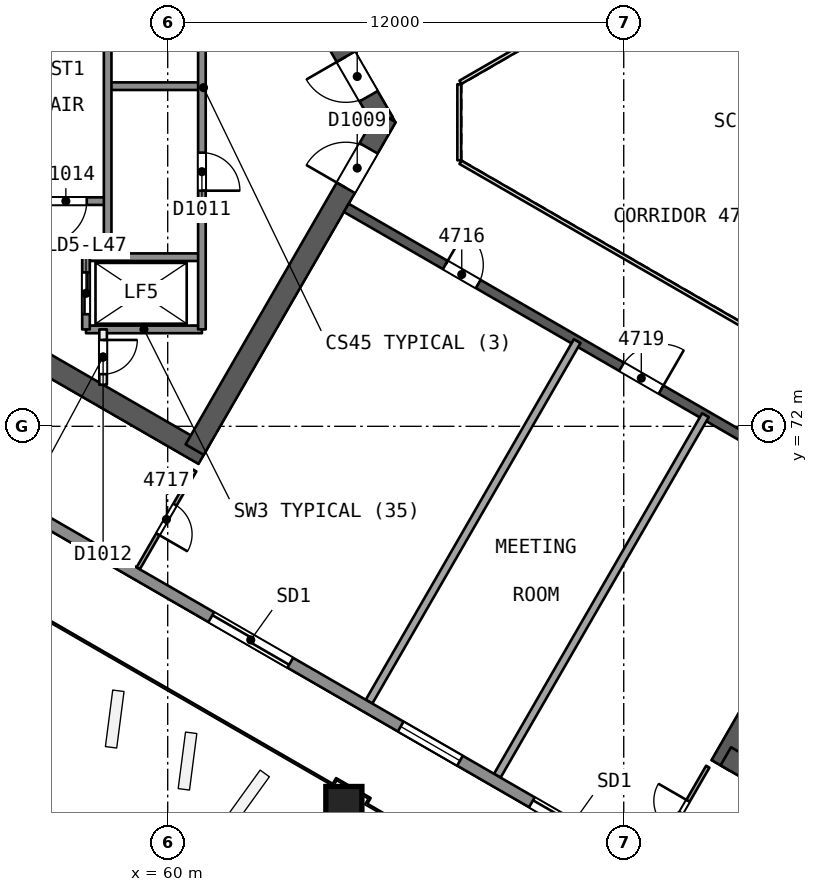
"""IFC4 building model, lengths in metres.
Left out: names, types, materials, properties, quantities, classifications, styles, units other than length and angle.
Written with IfcOpenShell. Run it as: python <this file> out.ifc"""

import sys

from ifc_helpers import new_model, si_unit, direction, frame, frame_2d, origin, origin_2d, place, context, subcontext, project, spatial, rectangle, extrude, element, fill, save


model = new_model("IFC4")
c1 = context("Model", 3, precision=1e-05, world=origin(), true_north=direction((0.0, 1.0)))
c2 = subcontext(c1, "Body", "Model", "MODEL_VIEW")
j1 = project(units=[si_unit("LENGTHUNIT", "METRE"), si_unit("PLANEANGLEUNIT", "RADIAN")], contexts=[c1])
p1 = place(None, origin())
s1 = spatial("IfcSite", under=j1, at=p1, CompositionType="ELEMENT")
p2 = place(p1, origin())
s2 = spatial("IfcBuilding", under=s1, at=p2, CompositionType="ELEMENT")
p3 = place(p2, frame((0.0, 0.0, 193.3)))
s3 = spatial("IfcBuildingStorey", under=s2, at=p3, CompositionType="ELEMENT", Elevation=193.3)
p4 = place(p3, frame((65.682, 80.0, 0.0), z_axis=(0.0, 0.0, 1.0), x_axis=(-0.500000202252, 0.866025287014, 0.0)))
e1 = element("IfcWall", 1, at=p4, inside=s3, PredefinedType="SHEAR", context=c2, shape_type="SweptSolid", body=[
    extrude(rectangle(XDim=10.221, YDim=0.55, at=frame_2d((5.111, 0.0))), origin(), (0.0, 0.0, 1.0), 3.7),
])
p5 = place(p4, frame((0.791, 0.0, 0.0)))
e2 = element("IfcOpeningElement", 2, at=p5, cuts=e1, PredefinedType="OPENING", context=c2, shape_type="SweptSolid", body=[
    extrude(rectangle(XDim=1.2, YDim=2.1, at=frame_2d((0.6, 1.05))), frame((0.0, 0.286, 0.0), z_axis=(0.0, -1.0, 0.0), x_axis=(1.0, 0.0, 0.0)), (0.0, 0.0, 1.0), 0.571),
])
p6 = place(p3, frame((60.709, 88.614, 0.0), z_axis=(0.0, 0.0, 1.0), x_axis=(-0.866020164116, -0.500009075263, 0.0)))
e3 = element("IfcWall", 3, at=p6, inside=s3, PredefinedType="SHEAR", context=c2, shape_type="SweptSolid", body=[
    extrude(rectangle(XDim=14.058, YDim=0.55, at=frame_2d((7.029, 0.0))), origin(), (0.0, 0.0, 1.0), 3.7),
])
p7 = place(p3, frame((48.672, 78.336, 0.0), z_axis=(0.0, 0.0, 1.0), x_axis=(0.866023530946, -0.500003243837, 0.0)))
e4 = element("IfcWall", 4, at=p7, inside=s3, PredefinedType="SHEAR", context=c2, shape_type="SweptSolid", body=[
    extrude(rectangle(XDim=14.175, YDim=0.55, at=frame_2d((7.087, 0.0))), origin(), (0.0, 0.0, 1.0), 3.7),
])
p8 = place(p3, frame((60.709, 71.386, 0.0), z_axis=(0.0, 0.0, 1.0), x_axis=(0.500015938302, 0.866016201606, 0.0)))
e5 = element("IfcWall", 5, at=p8, inside=s3, PredefinedType="SHEAR", context=c2, shape_type="SweptSolid", body=[
    extrude(rectangle(XDim=10.105, YDim=0.55, at=frame_2d((5.053, 0.0))), origin(), (0.0, 0.0, 1.0), 3.7),
])
p9 = place(p8, frame((7.955, 0.0, 0.0)))
e6 = element("IfcOpeningElement", 6, at=p9, cuts=e5, PredefinedType="OPENING", context=c2, shape_type="SweptSolid", body=[
    extrude(rectangle(XDim=1.2, YDim=2.1, at=frame_2d((0.6, 1.05))), frame((0.0, 0.286, 0.0), z_axis=(0.0, -1.0, 0.0), x_axis=(1.0, 0.0, 0.0)), (0.0, 0.0, 1.0), 0.571),
])
p10 = place(p3, frame((79.659, 71.931, 0.0), z_axis=(0.0, 0.0, 1.0), x_axis=(-0.500000202252, -0.866025287014, 0.0)))
e7 = element("IfcWall", 7, at=p10, inside=s3, PredefinedType="SHEAR", context=c2, shape_type="SweptSolid", body=[
    extrude(rectangle(XDim=10.221, YDim=0.55, at=frame_2d((5.111, 0.0))), origin(), (0.0, 0.0, 1.0), 3.7),
])
p11 = place(p10, frame((0.791, 0.0, 0.0)))
e8 = element("IfcOpeningElement", 8, at=p11, cuts=e7, PredefinedType="OPENING", context=c2, shape_type="SweptSolid", body=[
    extrude(rectangle(XDim=1.2, YDim=2.1, at=frame_2d((0.6, 1.05))), frame((0.0, 0.286, 0.0), z_axis=(0.0, -1.0, 0.0), x_axis=(1.0, 0.0, 0.0)), (0.0, 0.0, 1.0), 0.571),
])
p12 = place(p3, frame((74.686, 63.317, 0.0), z_axis=(0.0, 0.0, 1.0), x_axis=(0.866024505738, -0.500001555459, 0.0)))
e9 = element("IfcWall", 9, at=p12, inside=s3, PredefinedType="SHEAR", context=c2, shape_type="SweptSolid", body=[
    extrude(rectangle(XDim=14.059, YDim=0.55, at=frame_2d((7.029, 0.0))), origin(), (0.0, 0.0, 1.0), 3.7),
])
p13 = place(p3, frame((64.7, 77.748, 0.0), z_axis=(0.0, 0.0, 1.0), x_axis=(0.866026492143, -0.499998114903, 0.0)))
e10 = element("IfcWall", 10, at=p13, inside=s3, PredefinedType="SHEAR", context=c2, shape_type="SweptSolid", body=[
    extrude(rectangle(XDim=15.588, YDim=0.25, at=frame_2d((7.794, 0.0))), origin(), (0.0, 0.0, 1.0), 3.3),
])
p14 = place(p13, frame((3.007, 0.0, 0.0)))
e11 = element("IfcOpeningElement", 11, at=p14, cuts=e10, PredefinedType="OPENING", context=c2, shape_type="SweptSolid", body=[
    extrude(rectangle(XDim=1.0, YDim=2.1, at=frame_2d((0.5, 1.05))), frame((0.0, 0.135, 0.0), z_axis=(0.0, -1.0, 0.0), x_axis=(1.0, 0.0, 0.0)), (0.0, 0.0, 1.0), 0.271),
])
p15 = place(p13, frame((8.363, 0.0, 0.0)))
e12 = element("IfcOpeningElement", 12, at=p15, cuts=e10, PredefinedType="OPENING", context=c2, shape_type="SweptSolid", body=[
    extrude(rectangle(XDim=1.2, YDim=2.4, at=frame_2d((0.6, 1.2))), frame((0.0, 0.135, 0.0), z_axis=(0.0, -1.0, 0.0), x_axis=(1.0, 0.0, 0.0)), (0.0, 0.0, 1.0), 0.271),
])
p16 = place(p13, frame((12.75, 0.0, 0.0)))
e13 = element("IfcOpeningElement", 13, at=p16, cuts=e10, PredefinedType="OPENING", context=c2, shape_type="SweptSolid", body=[
    extrude(rectangle(XDim=1.0, YDim=2.1, at=frame_2d((0.5, 1.05))), frame((0.0, 0.135, 0.0), z_axis=(0.0, -1.0, 0.0), x_axis=(1.0, 0.0, 0.0)), (0.0, 0.0, 1.0), 0.271),
])
p17 = place(p3, frame((64.624, 62.027, 0.0), z_axis=(0.010093620709, 0.017482414954, 0.999796221231), x_axis=(-0.499907122366, -0.865843723195, 0.020187025824)))
e14 = element("IfcColumn", 14, at=p17, inside=s3, PredefinedType="COLUMN", context=c2, shape_type="SweptSolid", body=[
    extrude(rectangle(XDim=0.95, YDim=0.95, at=origin_2d()), origin(), (0.0, 0.0, 1.0), 3.701),
])
p18 = place(p3, frame((60.71, 70.838, 0.0), z_axis=(0.0, 0.0, 1.0), x_axis=(-0.49997816789, -0.866038008192, 0.0)))
e15 = element("IfcWall", 15, at=p18, inside=s3, PredefinedType="PARTITIONING", context=c2, shape_type="SweptSolid", body=[
    extrude(rectangle(XDim=2.975, YDim=0.1, at=frame_2d((1.488, 0.0))), origin(), (0.0, 0.0, 1.0), 3.3),
])
p19 = place(p18, frame((1.038, 0.0, 0.0)))
e16 = element("IfcOpeningElement", 16, at=p19, cuts=e15, PredefinedType="OPENING", context=c2, shape_type="SweptSolid", body=[
    extrude(rectangle(XDim=0.9, YDim=2.1, at=frame_2d((0.45, 1.05))), frame((0.0, 0.061, 0.0), z_axis=(0.0, -1.0, 0.0), x_axis=(1.0, 0.0, 0.0)), (0.0, 0.0, 1.0), 0.121),
])
for number, where, z_axis, x_axis in (
    (17, (65.298, 64.754, 0.0), (0.0, 0.0, 1.0), (0.5, 0.866, 0.0)),
    (18, (68.673, 62.806, 0.0), (0.0, 0.0, 1.0), (0.5, 0.866, 0.0)),
):
    element("IfcWall", number, at=place(p3, frame(where, z_axis=z_axis, x_axis=x_axis)), inside=s3, PredefinedType="PARTITIONING", context=c2, shape_type="SweptSolid", body=[
        extrude(rectangle(XDim=10.954, YDim=0.2, at=frame_2d((5.477, 0.0))), origin(), (0.0, 0.0, 1.0), 3.3),
    ])
p20 = place(p3, frame((72.723, 60.468, 0.0), z_axis=(0.0, 0.0, 1.0), x_axis=(0.49997816789, 0.866038008192, 0.0)))
e19 = element("IfcWall", 19, at=p20, inside=s3, PredefinedType="PARTITIONING", context=c2, shape_type="SweptSolid", body=[
    extrude(rectangle(XDim=2.975, YDim=0.1, at=frame_2d((1.488, 0.0))), origin(), (0.0, 0.0, 1.0), 3.3),
])
p21 = place(p20, frame((1.038, 0.0, 0.0)))
e20 = element("IfcOpeningElement", 20, at=p21, cuts=e19, PredefinedType="OPENING", context=c2, shape_type="SweptSolid", body=[
    extrude(rectangle(XDim=0.9, YDim=2.1, at=frame_2d((0.45, 1.05))), frame((0.0, 0.061, 0.0), z_axis=(0.0, -1.0, 0.0), x_axis=(1.0, 0.0, 0.0)), (0.0, 0.0, 1.0), 0.121),
])
p22 = place(p3, frame((88.565, 51.149, 0.0), z_axis=(0.0, 0.0, 1.0), x_axis=(-0.866025125259, 0.500000482419, 0.0)))
e21 = element("IfcWall", 21, at=p22, inside=s3, PredefinedType="SOLIDWALL", context=c2, shape_type="SweptSolid", body=[
    extrude(rectangle(XDim=52.347, YDim=0.3, at=frame_2d((26.173, 0.0))), origin(), (0.0, 0.0, 1.0), 3.3),
])
p23 = place(p22, frame((29.26, 0.0, 0.0)))
e22 = element("IfcOpeningElement", 22, at=p23, cuts=e21, PredefinedType="OPENING", context=c2, shape_type="SweptSolid", body=[
    extrude(rectangle(XDim=2.4, YDim=2.4, at=frame_2d((1.2, 1.2))), frame((0.0, 0.161, 0.0), z_axis=(0.0, -1.0, 0.0), x_axis=(1.0, 0.0, 0.0)), (0.0, 0.0, 1.0), 0.321),
])
p24 = place(p22, frame((40.7, 0.0, 0.0)))
e23 = element("IfcOpeningElement", 23, at=p24, cuts=e21, PredefinedType="OPENING", context=c2, shape_type="SweptSolid", body=[
    extrude(rectangle(XDim=2.4, YDim=2.4, at=frame_2d((1.2, 1.2))), frame((0.0, 0.161, 0.0), z_axis=(0.0, -1.0, 0.0), x_axis=(1.0, 0.0, 0.0)), (0.0, 0.0, 1.0), 0.321),
])
p25 = place(p22, frame((19.517, 0.0, 0.0)))
e24 = element("IfcOpeningElement", 24, at=p25, cuts=e21, PredefinedType="OPENING", context=c2, shape_type="SweptSolid", body=[
    extrude(rectangle(XDim=2.4, YDim=2.4, at=frame_2d((1.2, 1.2))), frame((0.0, 0.161, 0.0), z_axis=(0.0, -1.0, 0.0), x_axis=(1.0, 0.0, 0.0)), (0.0, 0.0, 1.0), 0.321),
])
p26 = place(p22, frame((9.27, 0.0, 0.0)))
e25 = element("IfcOpeningElement", 25, at=p26, cuts=e21, PredefinedType="OPENING", context=c2, shape_type="SweptSolid", body=[
    extrude(rectangle(XDim=2.4, YDim=2.4, at=frame_2d((1.2, 1.2))), frame((0.0, 0.161, 0.0), z_axis=(0.0, -1.0, 0.0), x_axis=(1.0, 0.0, 0.0)), (0.0, 0.0, 1.0), 0.321),
])
p27 = place(p22, frame((24.104, 0.0, 0.9)))
e26 = element("IfcOpeningElement", 26, at=p27, cuts=e21, PredefinedType="OPENING", context=c2, shape_type="SweptSolid", body=[
    extrude(rectangle(XDim=1.8, YDim=1.5, at=frame_2d((0.9, 0.75))), frame((0.0, 0.161, 0.0), z_axis=(0.0, -1.0, 0.0), x_axis=(1.0, 0.0, 0.0)), (0.0, 0.0, 1.0), 0.321),
])
p28 = place(p3, frame((60.9, 80.95, 0.0), z_axis=(0.0, 0.0, 1.0), x_axis=(-1.0, 0.0, 0.0)))
e27 = element("IfcWall", 27, at=p28, inside=s3, PredefinedType="SOLIDWALL", context=c2, shape_type="SweptSolid", body=[
    extrude(rectangle(XDim=2.48, YDim=0.2, at=frame_2d((1.24, 0.0))), origin(), (0.0, 0.0, 1.0), 3.3),
])
p29 = place(p3, frame((58.42, 77.925, 0.0), z_axis=(0.0, 0.0, 1.0), x_axis=(-1.0, 0.0, 0.0)))
e28 = element("IfcWall", 28, at=p29, inside=s3, PredefinedType="SOLIDWALL", context=c2, shape_type="SweptSolid", body=[
    extrude(rectangle(XDim=7.7, YDim=0.2, at=frame_2d((3.85, 0.0))), origin(), (0.0, 0.0, 1.0), 3.3),
])
p30 = place(p29, frame((0.55, 0.0, 0.0)))
e29 = element("IfcOpeningElement", 29, at=p30, cuts=e28, PredefinedType="OPENING", context=c2, shape_type="SweptSolid", body=[
    extrude(rectangle(XDim=1.1, YDim=2.1, at=frame_2d((0.55, 1.05))), frame((0.0, 0.11, 0.0), z_axis=(0.0, -1.0, 0.0), x_axis=(1.0, 0.0, 0.0)), (0.0, 0.0, 1.0), 0.221),
])
for number, where, z_axis, x_axis in (
    (30, (60.9, 76.45, 0.0), (0.0, 0.0, 1.0), (-1.0, 0.0, 0.0)),
    (31, (60.9, 74.55, 0.0), (0.0, 0.0, 1.0), (-1.0, 0.0, 0.0)),
):
    element("IfcWall", number, at=place(p3, frame(where, z_axis=z_axis, x_axis=x_axis)), inside=s3, PredefinedType="SOLIDWALL", context=c2, shape_type="SweptSolid", body=[
        extrude(rectangle(XDim=3.05, YDim=0.2, at=frame_2d((1.525, 0.0))), origin(), (0.0, 0.0, 1.0), 3.3),
    ])
p31 = place(p3, frame((60.9, 85.45, 0.0), z_axis=(0.0, 0.0, 1.0), x_axis=(0.0, -1.0, 0.0)))
e32 = element("IfcWall", 32, at=p31, inside=s3, PredefinedType="SOLIDWALL", context=c2, shape_type="SweptSolid", body=[
    extrude(rectangle(XDim=10.9, YDim=0.2, at=frame_2d((5.45, 0.0))), origin(), (0.0, 0.0, 1.0), 3.3),
])
p32 = place(p31, frame((1.75, 0.0, 0.0)))
e33 = element("IfcOpeningElement", 33, at=p32, cuts=e32, PredefinedType="OPENING", context=c2, shape_type="SweptSolid", body=[
    extrude(rectangle(XDim=1.0, YDim=2.1, at=frame_2d((0.5, 1.05))), frame((0.0, 0.11, 0.0), z_axis=(0.0, -1.0, 0.0), x_axis=(1.0, 0.0, 0.0)), (0.0, 0.0, 1.0), 0.221),
])
p33 = place(p31, frame((6.25, 0.0, 0.0)))
e34 = element("IfcOpeningElement", 34, at=p33, cuts=e32, PredefinedType="OPENING", context=c2, shape_type="SweptSolid", body=[
    extrude(rectangle(XDim=1.0, YDim=2.1, at=frame_2d((0.5, 1.05))), frame((0.0, 0.11, 0.0), z_axis=(0.0, -1.0, 0.0), x_axis=(1.0, 0.0, 0.0)), (0.0, 0.0, 1.0), 0.221),
])
p34 = place(p3, frame((58.42, 86.974, 0.0), z_axis=(0.0, 0.0, 1.0), x_axis=(0.0, -1.0, 0.0)))
e35 = element("IfcWall", 35, at=p34, inside=s3, PredefinedType="SOLIDWALL", context=c2, shape_type="SweptSolid", body=[
    extrude(rectangle(XDim=10.524, YDim=0.2, at=frame_2d((5.262, 0.0))), origin(), (0.0, 0.0, 1.0), 3.3),
])
p35 = place(p34, frame((0.312, 0.0, 0.0)))
e36 = element("IfcOpeningElement", 36, at=p35, cuts=e35, PredefinedType="OPENING", context=c2, shape_type="SweptSolid", body=[
    extrude(rectangle(XDim=0.9, YDim=2.1, at=frame_2d((0.45, 1.05))), frame((0.0, 0.11, 0.0), z_axis=(0.0, -1.0, 0.0), x_axis=(1.0, 0.0, 0.0)), (0.0, 0.0, 1.0), 0.221),
])
p36 = place(p3, frame((58.3, 74.55, 0.0), z_axis=(0.0, 0.0, 1.0), x_axis=(0.0, -1.0, 0.0)))
e37 = element("IfcWall", 37, at=p36, inside=s3, PredefinedType="PARTITIONING", context=c2, shape_type="SweptSolid", body=[
    extrude(rectangle(XDim=1.455, YDim=0.2, at=frame_2d((0.728, 0.0))), origin(), (0.0, 0.0, 1.0), 3.3),
])
p37 = place(p36, frame((0.278, 0.0, 0.0)))
e38 = element("IfcOpeningElement", 38, at=p37, cuts=e37, PredefinedType="OPENING", context=c2, shape_type="SweptSolid", body=[
    extrude(rectangle(XDim=0.9, YDim=2.1, at=frame_2d((0.45, 1.05))), frame((0.0, 0.11, 0.0), z_axis=(0.0, -1.0, 0.0), x_axis=(1.0, 0.0, 0.0)), (0.0, 0.0, 1.0), 0.221),
])
p38 = place(p3, frame((57.85, 76.45, 0.0), z_axis=(0.0, 0.0, 1.0), x_axis=(0.0, -1.0, 0.0)))
e39 = element("IfcWall", 39, at=p38, inside=s3, PredefinedType="SOLIDWALL", context=c2, shape_type="SweptSolid", body=[
    extrude(rectangle(XDim=1.9, YDim=0.2, at=frame_2d((0.95, 0.0))), origin(), (0.0, 0.0, 1.0), 3.3),
])
p39 = place(p38, frame((0.4, 0.0, 0.0)))
e40 = element("IfcOpeningElement", 40, at=p39, cuts=e39, PredefinedType="OPENING", context=c2, shape_type="SweptSolid", body=[
    extrude(rectangle(XDim=1.1, YDim=2.1, at=frame_2d((0.55, 1.05))), frame((0.0, 0.11, 0.0), z_axis=(0.0, -1.0, 0.0), x_axis=(1.0, 0.0, 0.0)), (0.0, 0.0, 1.0), 0.221),
])
p40 = place(p3, frame((77.738, 86.846, 0.0), z_axis=(0.0, 0.0, 1.0), x_axis=(-0.866026658274, -0.499997827154, 0.0)))
e41 = element("IfcWall", 41, at=p40, inside=s3, PredefinedType="PARTITIONING", context=c2, shape_type="SweptSolid", body=[
    extrude(rectangle(XDim=11.588, YDim=0.1, at=frame_2d((5.794, 0.0))), origin(), (0.0, 0.0, 1.0), 3.3),
])
p41 = place(p3, frame((67.672, 81.0, 0.0), z_axis=(0.0, 0.0, 1.0), x_axis=(0.0, -1.0, 0.0)))
e42 = element("IfcWall", 42, at=p41, inside=s3, PredefinedType="PARTITIONING", context=c2, shape_type="SweptSolid", body=[
    extrude(rectangle(XDim=2.0, YDim=0.1, at=frame_2d((1.0, 0.0))), origin(), (0.0, 0.0, 1.0), 3.3),
])
p42 = place(p3, frame((67.702, 78.948, 0.0), z_axis=(0.0, 0.0, 1.0), x_axis=(0.866026658274, -0.499997827154, 0.0)))
e43 = element("IfcWall", 43, at=p42, inside=s3, PredefinedType="PARTITIONING", context=c2, shape_type="SweptSolid", body=[
    extrude(rectangle(XDim=11.588, YDim=0.1, at=frame_2d((5.794, 0.0))), origin(), (0.0, 0.0, 1.0), 3.3),
])
p43 = place(p14, origin())
e44 = element("IfcDoor", 44, at=p43, inside=s3, OperationType="SINGLE_SWING_LEFT", PredefinedType="NOTDEFINED", context=c2, shape_type="SweptSolid", body=[
    extrude(rectangle(XDim=1.0, YDim=2.1, at=frame_2d((0.5, 1.05))), frame((0.0, 0.025, 0.0), z_axis=(0.0, -1.0, 0.0), x_axis=(1.0, 0.0, 0.0)), (0.0, 0.0, 1.0), 0.05),
])
fill(e11, e44)
p44 = place(p19, origin())
e45 = element("IfcDoor", 45, at=p44, inside=s3, OperationType="SINGLE_SWING_RIGHT", PredefinedType="NOTDEFINED", context=c2, shape_type="SweptSolid", body=[
    extrude(rectangle(XDim=0.9, YDim=2.1, at=frame_2d((0.45, 1.05))), frame((0.0, 0.025, 0.0), z_axis=(0.0, -1.0, 0.0), x_axis=(1.0, 0.0, 0.0)), (0.0, 0.0, 1.0), 0.05),
])
fill(e16, e45)
p45 = place(p15, origin())
e46 = element("IfcDoor", 46, at=p45, inside=s3, OperationType="SINGLE_SWING_RIGHT", PredefinedType="NOTDEFINED", context=c2, shape_type="SweptSolid", body=[
    extrude(rectangle(XDim=1.2, YDim=2.4, at=frame_2d((0.6, 1.2))), frame((0.0, 0.025, 0.0), z_axis=(0.0, -1.0, 0.0), x_axis=(1.0, 0.0, 0.0)), (0.0, 0.0, 1.0), 0.05),
])
fill(e12, e46)
p46 = place(p21, origin())
e47 = element("IfcDoor", 47, at=p46, inside=s3, OperationType="SINGLE_SWING_RIGHT", PredefinedType="NOTDEFINED", context=c2, shape_type="SweptSolid", body=[
    extrude(rectangle(XDim=0.9, YDim=2.1, at=frame_2d((0.45, 1.05))), frame((0.0, 0.025, 0.0), z_axis=(0.0, -1.0, 0.0), x_axis=(1.0, 0.0, 0.0)), (0.0, 0.0, 1.0), 0.05),
])
fill(e20, e47)
p47 = place(p23, origin())
e48 = element("IfcDoor", 48, at=p47, inside=s3, OperationType="SLIDING_TO_LEFT", PredefinedType="NOTDEFINED", context=c2, shape_type="SweptSolid", body=[
    extrude(rectangle(XDim=2.4, YDim=2.4, at=frame_2d((1.2, 1.2))), frame((0.0, 0.025, 0.0), z_axis=(0.0, -1.0, 0.0), x_axis=(1.0, 0.0, 0.0)), (0.0, 0.0, 1.0), 0.05),
])
fill(e22, e48)
p48 = place(p25, origin())
e49 = element("IfcDoor", 49, at=p48, inside=s3, OperationType="SLIDING_TO_LEFT", PredefinedType="NOTDEFINED", context=c2, shape_type="SweptSolid", body=[
    extrude(rectangle(XDim=2.4, YDim=2.4, at=frame_2d((1.2, 1.2))), frame((0.0, 0.025, 0.0), z_axis=(0.0, -1.0, 0.0), x_axis=(1.0, 0.0, 0.0)), (0.0, 0.0, 1.0), 0.05),
])
fill(e24, e49)
p49 = place(p27, origin())
e50 = element("IfcWindow", 50, at=p49, inside=s3, PartitioningType="SINGLE_PANEL", PredefinedType="WINDOW", context=c2, shape_type="SweptSolid", body=[
    extrude(rectangle(XDim=1.8, YDim=1.5, at=frame_2d((0.9, 0.75))), frame((0.0, 0.03, 0.0), z_axis=(0.0, -1.0, 0.0), x_axis=(1.0, 0.0, 0.0)), (0.0, 0.0, 1.0), 0.06),
])
fill(e26, e50)
p50 = place(p5, origin())
e51 = element("IfcDoor", 51, at=p50, inside=s3, OperationType="SINGLE_SWING_RIGHT", PredefinedType="NOTDEFINED", context=c2, shape_type="SweptSolid", body=[
    extrude(rectangle(XDim=1.2, YDim=2.1, at=frame_2d((0.6, 1.05))), frame((0.0, 0.025, 0.0), z_axis=(0.0, -1.0, 0.0), x_axis=(1.0, 0.0, 0.0)), (0.0, 0.0, 1.0), 0.05),
])
fill(e2, e51)
p51 = place(p9, origin())
e52 = element("IfcDoor", 52, at=p51, inside=s3, OperationType="SINGLE_SWING_LEFT", PredefinedType="NOTDEFINED", context=c2, shape_type="SweptSolid", body=[
    extrude(rectangle(XDim=1.2, YDim=2.1, at=frame_2d((0.6, 1.05))), frame((0.0, 0.025, 0.0), z_axis=(0.0, -1.0, 0.0), x_axis=(1.0, 0.0, 0.0)), (0.0, 0.0, 1.0), 0.05),
])
fill(e6, e52)
p52 = place(p39, origin())
e53 = element("IfcDoor", 53, at=p52, inside=s3, OperationType="SLIDING_TO_RIGHT", PredefinedType="NOTDEFINED", context=c2, shape_type="SweptSolid", body=[
    extrude(rectangle(XDim=1.1, YDim=2.1, at=frame_2d((0.55, 1.05))), frame((0.0, 0.025, 0.0), z_axis=(0.0, -1.0, 0.0), x_axis=(1.0, 0.0, 0.0)), (0.0, 0.0, 1.0), 0.05),
])
fill(e40, e53)
p53 = place(p33, origin())
e54 = element("IfcDoor", 54, at=p53, inside=s3, OperationType="SINGLE_SWING_RIGHT", PredefinedType="NOTDEFINED", context=c2, shape_type="SweptSolid", body=[
    extrude(rectangle(XDim=1.0, YDim=2.1, at=frame_2d((0.5, 1.05))), frame((0.0, 0.025, 0.0), z_axis=(0.0, -1.0, 0.0), x_axis=(1.0, 0.0, 0.0)), (0.0, 0.0, 1.0), 0.05),
])
fill(e34, e54)
p54 = place(p37, origin())
e55 = element("IfcDoor", 55, at=p54, inside=s3, OperationType="SINGLE_SWING_LEFT", PredefinedType="NOTDEFINED", context=c2, shape_type="SweptSolid", body=[
    extrude(rectangle(XDim=0.9, YDim=2.1, at=frame_2d((0.45, 1.05))), frame((0.0, 0.025, 0.0), z_axis=(0.0, -1.0, 0.0), x_axis=(1.0, 0.0, 0.0)), (0.0, 0.0, 1.0), 0.05),
])
fill(e38, e55)
p55 = place(p30, origin())
e56 = element("IfcDoor", 56, at=p55, inside=s3, OperationType="SINGLE_SWING_RIGHT", PredefinedType="NOTDEFINED", context=c2, shape_type="SweptSolid", body=[
    extrude(rectangle(XDim=1.1, YDim=2.1, at=frame_2d((0.55, 1.05))), frame((0.0, 0.025, 0.0), z_axis=(0.0, -1.0, 0.0), x_axis=(1.0, 0.0, 0.0)), (0.0, 0.0, 1.0), 0.05),
])
fill(e29, e56)
save(model, sys.argv[1])
